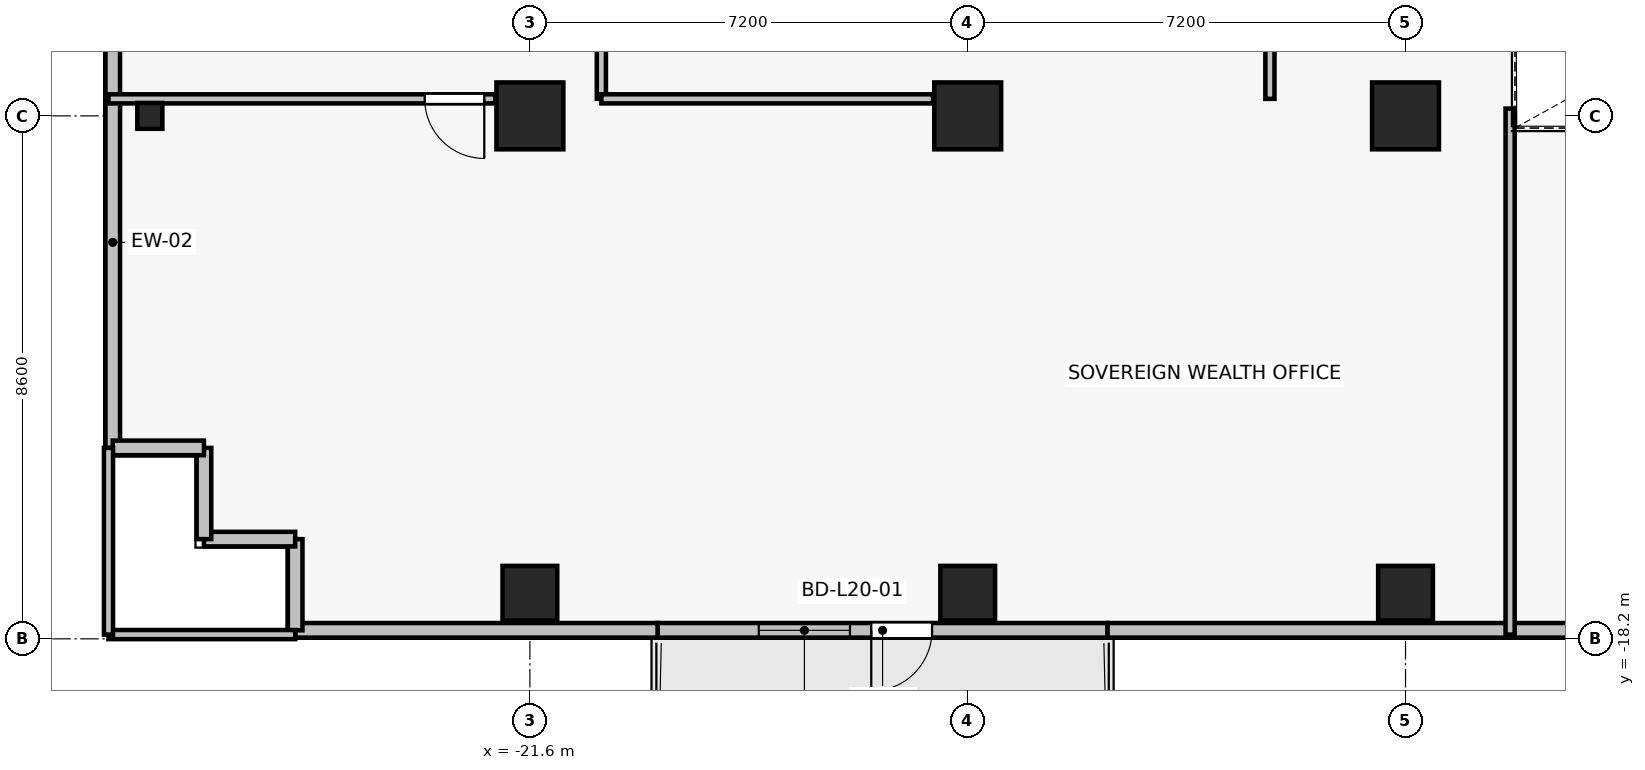
"""IFC4 building model, lengths in metres.
Left out: names, types, materials, properties, quantities, classifications, styles, units other than length and angle.
Written with IfcOpenShell. Run it as: python <this file> out.ifc"""

import sys

from ifc_helpers import new_model, si_unit, direction, frame, frame_2d, origin, origin_2d, place, context, subcontext, project, spatial, rectangle, i_section, extrude, source, transform, mapped, element, fill, save


model = new_model("IFC4")
c1 = context("Model", 3, precision=1e-05, world=origin(), true_north=direction((0.0, 1.0)))
c2 = subcontext(c1, "Body", "Model", "MODEL_VIEW")
j1 = project(units=[si_unit("LENGTHUNIT", "METRE"), si_unit("PLANEANGLEUNIT", "RADIAN")], contexts=[c1])
p1 = place(None, origin())
s1 = spatial("IfcSite", under=j1, at=p1, CompositionType="ELEMENT")
p2 = place(p1, origin())
s2 = spatial("IfcBuilding", under=s1, at=p2, CompositionType="ELEMENT")
p3 = place(p2, frame((0.0, 0.0, 73.6)))
s3 = spatial("IfcBuildingStorey", under=s2, at=p3, CompositionType="ELEMENT", Elevation=73.6)
for number, where, z_axis, x_axis in (
    (1, (-14.4, -9.6, 0.0), (0.0, 0.0, 1.0), (1.0, 0.0, 0.0)),
    (2, (-7.2, -9.6, 0.0), (0.0, 0.0, 1.0), (1.0, 0.0, 0.0)),
    (3, (-21.6, -9.6, 0.0), (0.0, 0.0, 1.0), (1.0, 0.0, 0.0)),
):
    element("IfcColumn", number, at=place(p3, frame(where, z_axis=z_axis, x_axis=x_axis)), inside=s3, PredefinedType="COLUMN", context=c2, shape_type="SweptSolid", body=[
        extrude(rectangle(XDim=1.1, YDim=1.1, at=origin_2d()), origin(), (0.0, 0.0, 1.0), 3.3),
    ])
for number, where, z_axis, x_axis in (
    (4, (-14.4, -17.45, 0.0), (0.0, 0.0, 1.0), (1.0, 0.0, 0.0)),
    (5, (-7.2, -17.45, 0.0), (0.0, 0.0, 1.0), (1.0, 0.0, 0.0)),
    (6, (-21.6, -17.45, 0.0), (0.0, 0.0, 1.0), (1.0, 0.0, 0.0)),
):
    element("IfcColumn", number, at=place(p3, frame(where, z_axis=z_axis, x_axis=x_axis)), inside=s3, PredefinedType="COLUMN", context=c2, shape_type="SweptSolid", body=[
        extrude(rectangle(XDim=0.9, YDim=0.9, at=origin_2d()), origin(), (0.0, 0.0, 1.0), 3.3),
    ])
p4 = place(p3, frame((-27.85, -9.6, 0.0), z_axis=(0.0, 0.0, 1.0), x_axis=(1.0, 0.0, 0.0)))
e7 = element("IfcColumn", 7, at=p4, inside=s3, PredefinedType="COLUMN", context=c2, shape_type="SweptSolid", body=[
    extrude(i_section(OverallWidth=0.412, OverallDepth=0.425, WebThickness=0.026, FlangeThickness=0.039, FilletRadius=0.015, at=origin_2d()), origin(), (0.0, 0.0, 1.0), 3.3),
])
p5 = place(p3, frame((-12.1, -18.06, 0.0), z_axis=(0.0, 0.0, 1.0), x_axis=(-1.0, 0.0, 0.0)))
e8 = element("IfcWall", 8, at=p5, inside=s3, PredefinedType="SOLIDWALL", context=c2, shape_type="SweptSolid", body=[
    extrude(rectangle(XDim=7.4, YDim=0.24, at=frame_2d((3.7, 0.0))), origin(), (0.0, 0.0, 1.0), 2.665),
])
p6 = place(p5, frame((2.886, 0.0, 0.0)))
e9 = element("IfcOpeningElement", 9, at=p6, cuts=e8, PredefinedType="OPENING", context=c2, shape_type="SweptSolid", body=[
    extrude(rectangle(XDim=1.0, YDim=2.2, at=frame_2d((0.5, 1.1))), frame((0.0, 0.13, 0.0), z_axis=(0.0, -1.0, 0.0), x_axis=(1.0, 0.0, 0.0)), (0.0, 0.0, 1.0), 0.26),
])
p7 = place(p5, frame((4.236, 0.0, 0.85)))
e10 = element("IfcOpeningElement", 10, at=p7, cuts=e8, PredefinedType="OPENING", context=c2, shape_type="SweptSolid", body=[
    extrude(rectangle(XDim=1.5, YDim=1.6, at=frame_2d((0.75, 0.8))), frame((0.0, 0.13, 0.0), z_axis=(0.0, -1.0, 0.0), x_axis=(1.0, 0.0, 0.0)), (0.0, 0.0, 1.0), 0.26),
])
p8 = place(p3, frame((-28.46, -8.3, 0.0), z_axis=(0.0, 0.0, 1.0), x_axis=(0.0, -1.0, 0.0)))
e11 = element("IfcWall", 11, at=p8, inside=s3, PredefinedType="SOLIDWALL", context=c2, shape_type="SweptSolid", body=[
    extrude(rectangle(XDim=6.76, YDim=0.24, at=frame_2d((3.38, 0.0))), origin(), (0.0, 0.0, 1.0), 3.075),
])
p9 = place(p3, frame((-12.1, -18.06, 0.0), z_axis=(0.0, 0.0, 1.0), x_axis=(1.0, 0.0, 0.0)))
e12 = element("IfcWall", 12, at=p9, inside=s3, PredefinedType="SOLIDWALL", context=c2, shape_type="SweptSolid", body=[
    extrude(rectangle(XDim=8.76, YDim=0.24, at=frame_2d((4.38, 0.0))), origin(), (0.0, 0.0, 1.0), 3.075),
])
p10 = place(p3, frame((-25.46, -18.06, 0.0), z_axis=(0.0, 0.0, 1.0), x_axis=(1.0, 0.0, 0.0)))
e13 = element("IfcWall", 13, at=p10, inside=s3, PredefinedType="SOLIDWALL", context=c2, shape_type="SweptSolid", body=[
    extrude(rectangle(XDim=5.96, YDim=0.24, at=frame_2d((2.98, 0.0))), origin(), (0.0, 0.0, 1.0), 2.665),
])
for number, where, z_axis, x_axis in (
    (14, (-25.46, -16.56, 0.0), (0.0, 0.0, 1.0), (0.0, -1.0, 0.0)),
    (15, (-26.96, -16.56, 0.0), (0.0, 0.0, 1.0), (1.0, 0.0, 0.0)),
    (16, (-26.96, -15.06, 0.0), (0.0, 0.0, 1.0), (0.0, -1.0, 0.0)),
    (17, (-28.46, -15.06, 0.0), (0.0, 0.0, 1.0), (1.0, 0.0, 0.0)),
):
    element("IfcWall", number, at=place(p3, frame(where, z_axis=z_axis, x_axis=x_axis)), inside=s3, PredefinedType="SOLIDWALL", context=c2, shape_type="SweptSolid", body=[
        extrude(rectangle(XDim=1.5, YDim=0.24, at=frame_2d((0.75, 0.0))), origin(), (0.0, 0.0, 1.0), 3.075),
    ])
p11 = place(p3, frame((-22.17, -9.32, 0.0), z_axis=(0.0, 0.0, 1.0), x_axis=(-1.0, 0.0, 0.0)))
e18 = element("IfcWall", 18, at=p11, inside=s3, PredefinedType="PARTITIONING", context=c2, shape_type="SweptSolid", body=[
    extrude(rectangle(XDim=6.36, YDim=0.15, at=frame_2d((3.18, 0.0))), origin(), (0.0, 0.0, 1.0), 2.465),
])
p12 = place(p11, frame((0.18, 0.0, 0.0)))
e19 = element("IfcOpeningElement", 19, at=p12, cuts=e18, PredefinedType="OPENING", context=c2, shape_type="SweptSolid", body=[
    extrude(rectangle(XDim=0.98, YDim=2.15, at=frame_2d((0.49, 1.075))), frame((0.0, 0.085, 0.0), z_axis=(0.0, -1.0, 0.0), x_axis=(1.0, 0.0, 0.0)), (0.0, 0.0, 1.0), 0.17),
])
p13 = place(p3, frame((-20.425, -3.83, 0.0), z_axis=(0.0, 0.0, 1.0), x_axis=(0.0, -1.0, 0.0)))
e20 = element("IfcWall", 20, at=p13, inside=s3, PredefinedType="PARTITIONING", context=c2, shape_type="SweptSolid", body=[
    extrude(rectangle(XDim=5.49, YDim=0.15, at=frame_2d((2.745, 0.0))), origin(), (0.0, 0.0, 1.0), 2.465),
])
p14 = place(p3, frame((-14.97, -9.32, 0.0), z_axis=(0.0, 0.0, 1.0), x_axis=(-1.0, 0.0, 0.0)))
e21 = element("IfcWall", 21, at=p14, inside=s3, PredefinedType="PARTITIONING", context=c2, shape_type="SweptSolid", body=[
    extrude(rectangle(XDim=5.455, YDim=0.15, at=frame_2d((2.727, 0.0))), origin(), (0.0, 0.0, 1.0), 2.465),
])
p15 = place(p3, frame((-9.43, -3.83, 0.0), z_axis=(0.0, 0.0, 1.0), x_axis=(0.0, -1.0, 0.0)))
e22 = element("IfcWall", 22, at=p15, inside=s3, PredefinedType="PARTITIONING", context=c2, shape_type="SweptSolid", body=[
    extrude(rectangle(XDim=5.49, YDim=0.15, at=frame_2d((2.745, 0.0))), origin(), (0.0, 0.0, 1.0), 2.465),
])
p16 = place(p3, frame((-25.46, -18.13, 0.0), z_axis=(0.0, 0.0, 1.0), x_axis=(-1.0, 0.0, 0.0)))
e23 = element("IfcWall", 23, at=p16, inside=s3, PredefinedType="PARTITIONING", context=c2, shape_type="SweptSolid", body=[
    extrude(rectangle(XDim=3.07, YDim=0.15, at=frame_2d((1.535, 0.0))), origin(), (0.0, 0.0, 1.0), 2.665),
])
p17 = place(p3, frame((-28.53, -18.13, 0.0), z_axis=(0.0, 0.0, 1.0), x_axis=(0.0, 1.0, 0.0)))
e24 = element("IfcWall", 24, at=p17, inside=s3, PredefinedType="PARTITIONING", context=c2, shape_type="SweptSolid", body=[
    extrude(rectangle(XDim=3.07, YDim=0.15, at=frame_2d((1.535, 0.0))), origin(), (0.0, 0.0, 1.0), 3.075),
])
p18 = place(p3, frame((-5.48, -9.48, 0.0), z_axis=(0.0, 0.0, 1.0), x_axis=(0.0, -1.0, 0.0)))
e25 = element("IfcWall", 25, at=p18, inside=s3, PredefinedType="PARTITIONING", context=c2, shape_type="SweptSolid", body=[
    extrude(rectangle(XDim=8.65, YDim=0.15, at=frame_2d((4.325, 0.0))), origin(), (0.0, 0.0, 1.0), 2.465),
])
m1 = source(origin(), c2, "Body", "SweptSolid", [
    extrude(rectangle(XDim=1.0, YDim=2.2, at=frame_2d((0.5, 1.1))), frame((0.0, 0.025, 0.0), z_axis=(0.0, -1.0, 0.0), x_axis=(1.0, 0.0, 0.0)), (0.0, 0.0, 1.0), 0.05),
])
p19 = place(p6, origin())
e26 = element("IfcDoor", 26, at=p19, inside=s3, OperationType="SINGLE_SWING_RIGHT", PredefinedType="DOOR", context=c2, shape_type="MappedRepresentation", body=[
    mapped(m1, transform((0.0, 0.0, 0.0), x_axis=(1.0, 0.0, 0.0), y_axis=(0.0, 1.0, 0.0), z_axis=(0.0, 0.0, 1.0), scale=1.0)),
])
fill(e9, e26)
m2 = source(origin(), c2, "Body", "SweptSolid", [
    extrude(rectangle(XDim=1.5, YDim=1.6, at=frame_2d((0.75, 0.8))), frame((0.0, 0.03, 0.0), z_axis=(0.0, -1.0, 0.0), x_axis=(1.0, 0.0, 0.0)), (0.0, 0.0, 1.0), 0.06),
])
p20 = place(p7, origin())
e27 = element("IfcWindow", 27, at=p20, inside=s3, PartitioningType="SINGLE_PANEL", PredefinedType="WINDOW", context=c2, shape_type="MappedRepresentation", body=[
    mapped(m2, transform((0.0, 0.0, 0.0), x_axis=(1.0, 0.0, 0.0), y_axis=(0.0, 1.0, 0.0), z_axis=(0.0, 0.0, 1.0), scale=1.0)),
])
fill(e10, e27)
m3 = source(origin(), c2, "Body", "SweptSolid", [
    extrude(rectangle(XDim=0.98, YDim=2.15, at=frame_2d((0.49, 1.075))), frame((0.0, 0.025, 0.0), z_axis=(0.0, -1.0, 0.0), x_axis=(1.0, 0.0, 0.0)), (0.0, 0.0, 1.0), 0.05),
])
p21 = place(p12, origin())
e28 = element("IfcDoor", 28, at=p21, inside=s3, OperationType="SINGLE_SWING_LEFT", PredefinedType="DOOR", context=c2, shape_type="MappedRepresentation", body=[
    mapped(m3, transform((0.0, 0.0, 0.0), x_axis=(1.0, 0.0, 0.0), y_axis=(0.0, 1.0, 0.0), z_axis=(0.0, 0.0, 1.0), scale=1.0)),
])
fill(e19, e28)
save(model, sys.argv[1])
